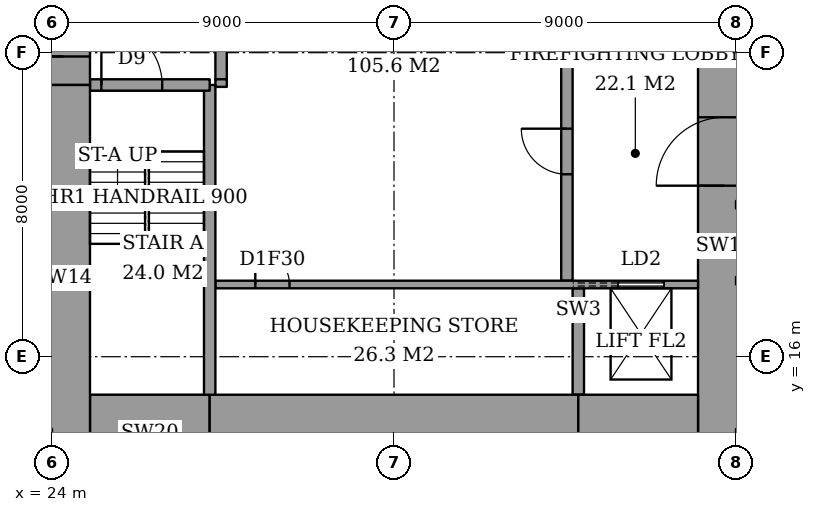
"""IFC4 building model, lengths in metres.
Left out: names, types, materials, properties, quantities, classifications, styles, units other than length and angle.
Written with IfcOpenShell. Run it as: python <this file> out.ifc"""

import sys

from ifc_helpers import new_model, si_unit, direction, frame, frame_2d, origin, place, context, subcontext, project, spatial, rectangle, extrude, element, fill, save


model = new_model("IFC4")
c1 = context("Model", 3, precision=1e-05, world=origin(), true_north=direction((0.0, 1.0)))
c2 = subcontext(c1, "Body", "Model", "MODEL_VIEW")
j1 = project(units=[si_unit("LENGTHUNIT", "METRE"), si_unit("PLANEANGLEUNIT", "RADIAN")], contexts=[c1])
p1 = place(None, origin())
s1 = spatial("IfcSite", under=j1, at=p1, CompositionType="ELEMENT")
p2 = place(p1, origin())
s2 = spatial("IfcBuilding", under=s1, at=p2, CompositionType="ELEMENT")
p3 = place(p2, frame((0.0, 0.0, 200.2)))
s3 = spatial("IfcBuildingStorey", under=s2, at=p3, CompositionType="ELEMENT", Elevation=200.2)
p4 = place(p3, frame((25.0, 14.0, 0.0), z_axis=(0.0, 0.0, 1.0), x_axis=(1.0, 0.0, 0.0)))
e1 = element("IfcWall", 1, at=p4, inside=s3, PredefinedType="SHEAR", context=c2, shape_type="SweptSolid", body=[
    extrude(rectangle(XDim=3.15, YDim=2.0, at=frame_2d((1.575, 0.0))), origin(), (0.0, 0.0, 1.0), 3.6),
])
p5 = place(p3, frame((28.15, 14.0, 0.0), z_axis=(0.0, 0.0, 1.0), x_axis=(1.0, 0.0, 0.0)))
e2 = element("IfcWall", 2, at=p5, inside=s3, PredefinedType="SHEAR", context=c2, shape_type="SweptSolid", body=[
    extrude(rectangle(XDim=9.7, YDim=2.0, at=frame_2d((4.85, 0.0))), origin(), (0.0, 0.0, 1.0), 3.6),
])
p6 = place(p3, frame((37.85, 14.0, 0.0), z_axis=(0.0, 0.0, 1.0), x_axis=(1.0, 0.0, 0.0)))
e3 = element("IfcWall", 3, at=p6, inside=s3, PredefinedType="SHEAR", context=c2, shape_type="SweptSolid", body=[
    extrude(rectangle(XDim=3.15, YDim=2.0, at=frame_2d((1.575, 0.0))), origin(), (0.0, 0.0, 1.0), 3.6),
])
p7 = place(p3, frame((24.3, 13.0, 0.0), z_axis=(0.0, 0.0, 1.0), x_axis=(0.0, 1.0, 0.0)))
e4 = element("IfcWall", 4, at=p7, inside=s3, PredefinedType="SHEAR", context=c2, shape_type="SweptSolid", body=[
    extrude(rectangle(XDim=10.15, YDim=1.4, at=frame_2d((5.075, 0.0))), origin(), (0.0, 0.0, 1.0), 3.6),
])
p8 = place(p3, frame((24.3, 23.15, 0.0), z_axis=(0.0, 0.0, 1.0), x_axis=(0.0, 1.0, 0.0)))
e5 = element("IfcWall", 5, at=p8, inside=s3, PredefinedType="SHEAR", context=c2, shape_type="SweptSolid", body=[
    extrude(rectangle(XDim=11.85, YDim=1.4, at=frame_2d((5.925, 0.0))), origin(), (0.0, 0.0, 1.0), 3.6),
])
p9 = place(p8, frame((0.75, 0.0, 0.0)))
e6 = element("IfcOpeningElement", 6, at=p9, cuts=e5, PredefinedType="OPENING", context=c2, shape_type="SweptSolid", body=[
    extrude(rectangle(XDim=1.8, YDim=2.4, at=frame_2d((0.9, 1.2))), frame((0.0, 0.71, 0.0), z_axis=(0.0, -1.0, 0.0), x_axis=(1.0, 0.0, 0.0)), (0.0, 0.0, 1.0), 1.42),
])
p10 = place(p3, frame((41.7, 13.0, 0.0), z_axis=(0.0, 0.0, 1.0), x_axis=(0.0, 1.0, 0.0)))
e7 = element("IfcWall", 7, at=p10, inside=s3, PredefinedType="SHEAR", context=c2, shape_type="SweptSolid", body=[
    extrude(rectangle(XDim=11.85, YDim=1.4, at=frame_2d((5.925, 0.0))), origin(), (0.0, 0.0, 1.0), 3.6),
])
p11 = place(p10, frame((7.5, 0.0, 0.0)))
e8 = element("IfcOpeningElement", 8, at=p11, cuts=e7, PredefinedType="OPENING", context=c2, shape_type="SweptSolid", body=[
    extrude(rectangle(XDim=1.8, YDim=2.4, at=frame_2d((0.9, 1.2))), frame((0.0, 0.71, 0.0), z_axis=(0.0, -1.0, 0.0), x_axis=(1.0, 0.0, 0.0)), (0.0, 0.0, 1.0), 1.42),
])
p12 = place(p3, frame((28.15, 15.0, 0.0), z_axis=(0.0, 0.0, 1.0), x_axis=(0.0, 1.0, 0.0)))
e9 = element("IfcWall", 9, at=p12, inside=s3, PredefinedType="SHEAR", context=c2, shape_type="SweptSolid", body=[
    extrude(rectangle(XDim=8.15, YDim=0.3, at=frame_2d((4.075, 0.0))), origin(), (0.0, 0.0, 1.0), 3.6),
])
p13 = place(p3, frame((25.0, 23.15, 0.0), z_axis=(0.0, 0.0, 1.0), x_axis=(1.0, 0.0, 0.0)))
e10 = element("IfcWall", 10, at=p13, inside=s3, PredefinedType="SHEAR", context=c2, shape_type="SweptSolid", body=[
    extrude(rectangle(XDim=3.15, YDim=0.3, at=frame_2d((1.575, 0.0))), origin(), (0.0, 0.0, 1.0), 3.6),
])
p14 = place(p13, frame((0.3, 0.0, 0.0)))
e11 = element("IfcOpeningElement", 11, at=p14, cuts=e10, PredefinedType="OPENING", context=c2, shape_type="SweptSolid", body=[
    extrude(rectangle(XDim=1.6, YDim=2.1, at=frame_2d((0.8, 1.05))), frame((0.0, 0.16, 0.0), z_axis=(0.0, -1.0, 0.0), x_axis=(1.0, 0.0, 0.0)), (0.0, 0.0, 1.0), 0.32),
])
p15 = place(p3, frame((28.45, 23.3, 0.0), z_axis=(0.0, 0.0, 1.0), x_axis=(0.0, 1.0, 0.0)))
e12 = element("IfcWall", 12, at=p15, inside=s3, PredefinedType="PARTITIONING", context=c2, shape_type="SweptSolid", body=[
    extrude(rectangle(XDim=6.7, YDim=0.3, at=frame_2d((3.35, 0.0))), origin(), (0.0, 0.0, 1.0), 3.6),
])
p16 = place(p15, frame((2.7, 0.0, 0.0)))
e13 = element("IfcOpeningElement", 13, at=p16, cuts=e12, PredefinedType="OPENING", context=c2, shape_type="SweptSolid", body=[
    extrude(rectangle(XDim=1.2, YDim=2.1, at=frame_2d((0.6, 1.05))), frame((0.0, 0.16, 0.0), z_axis=(0.0, -1.0, 0.0), x_axis=(1.0, 0.0, 0.0)), (0.0, 0.0, 1.0), 0.32),
])
p17 = place(p3, frame((37.55, 18.0, 0.0), z_axis=(0.0, 0.0, 1.0), x_axis=(0.0, 1.0, 0.0)))
e14 = element("IfcWall", 14, at=p17, inside=s3, PredefinedType="PARTITIONING", context=c2, shape_type="SweptSolid", body=[
    extrude(rectangle(XDim=6.7, YDim=0.3, at=frame_2d((3.35, 0.0))), origin(), (0.0, 0.0, 1.0), 3.6),
])
p18 = place(p17, frame((2.8, 0.0, 0.0)))
e15 = element("IfcOpeningElement", 15, at=p18, cuts=e14, PredefinedType="OPENING", context=c2, shape_type="SweptSolid", body=[
    extrude(rectangle(XDim=1.2, YDim=2.1, at=frame_2d((0.6, 1.05))), frame((0.0, 0.16, 0.0), z_axis=(0.0, -1.0, 0.0), x_axis=(1.0, 0.0, 0.0)), (0.0, 0.0, 1.0), 0.32),
])
p19 = place(p3, frame((28.3, 17.9, 0.0), z_axis=(0.0, 0.0, 1.0), x_axis=(1.0, 0.0, 0.0)))
e16 = element("IfcWall", 16, at=p19, inside=s3, PredefinedType="PARTITIONING", context=c2, shape_type="SweptSolid", body=[
    extrude(rectangle(XDim=12.7, YDim=0.2, at=frame_2d((6.35, 0.0))), origin(), (0.0, 0.0, 1.0), 3.6),
])
p20 = place(p19, frame((1.05, 0.0, 0.0)))
e17 = element("IfcOpeningElement", 17, at=p20, cuts=e16, PredefinedType="OPENING", context=c2, shape_type="SweptSolid", body=[
    extrude(rectangle(XDim=0.9, YDim=2.1, at=frame_2d((0.45, 1.05))), frame((0.0, 0.11, 0.0), z_axis=(0.0, -1.0, 0.0), x_axis=(1.0, 0.0, 0.0)), (0.0, 0.0, 1.0), 0.22),
])
p21 = place(p19, frame((10.6, 0.0, 0.0)))
e18 = element("IfcOpeningElement", 18, at=p21, cuts=e16, PredefinedType="OPENING", context=c2, shape_type="SweptSolid", body=[
    extrude(rectangle(XDim=1.2, YDim=2.1, at=frame_2d((0.6, 1.05))), frame((0.0, 0.11, 0.0), z_axis=(0.0, -1.0, 0.0), x_axis=(1.0, 0.0, 0.0)), (0.0, 0.0, 1.0), 0.22),
])
p22 = place(p3, frame((37.85, 15.0, 0.0), z_axis=(0.0, 0.0, 1.0), x_axis=(0.0, 1.0, 0.0)))
e19 = element("IfcWall", 19, at=p22, inside=s3, PredefinedType="SHEAR", context=c2, shape_type="SweptSolid", body=[
    extrude(rectangle(XDim=2.8, YDim=0.3, at=frame_2d((1.4, 0.0))), origin(), (0.0, 0.0, 1.0), 3.6),
])
p23 = place(p3, frame((28.3, 23.2, 0.0), z_axis=(0.0, 0.0, 1.0), x_axis=(1.0, 0.0, 0.0)))
e20 = element("IfcWall", 20, at=p23, inside=s3, PredefinedType="PARTITIONING", context=c2, shape_type="SweptSolid", body=[
    extrude(rectangle(XDim=0.3, YDim=0.2, at=frame_2d((0.15, 0.0))), origin(), (0.0, 0.0, 1.0), 3.6),
])
p24 = place(p14, origin())
e21 = element("IfcDoor", 21, at=p24, inside=s3, OperationType="DOUBLE_DOOR_SINGLE_SWING", PredefinedType="DOOR", context=c2, shape_type="SweptSolid", body=[
    extrude(rectangle(XDim=1.6, YDim=2.1, at=frame_2d((0.8, 1.05))), frame((0.0, 0.025, 0.0), z_axis=(0.0, -1.0, 0.0), x_axis=(1.0, 0.0, 0.0)), (0.0, 0.0, 1.0), 0.05),
])
fill(e11, e21)
p25 = place(p18, origin())
e22 = element("IfcDoor", 22, at=p25, inside=s3, OperationType="SINGLE_SWING_LEFT", PredefinedType="DOOR", context=c2, shape_type="SweptSolid", body=[
    extrude(rectangle(XDim=1.2, YDim=2.1, at=frame_2d((0.6, 1.05))), frame((0.0, 0.025, 0.0), z_axis=(0.0, -1.0, 0.0), x_axis=(1.0, 0.0, 0.0)), (0.0, 0.0, 1.0), 0.05),
])
fill(e15, e22)
p26 = place(p9, origin())
e23 = element("IfcDoor", 23, at=p26, inside=s3, OperationType="DOUBLE_DOOR_DOUBLE_SWING", PredefinedType="DOOR", context=c2, shape_type="SweptSolid", body=[
    extrude(rectangle(XDim=1.8, YDim=2.4, at=frame_2d((0.9, 1.2))), frame((0.0, 0.025, 0.0), z_axis=(0.0, -1.0, 0.0), x_axis=(1.0, 0.0, 0.0)), (0.0, 0.0, 1.0), 0.05),
])
fill(e6, e23)
p27 = place(p11, origin())
e24 = element("IfcDoor", 24, at=p27, inside=s3, OperationType="DOUBLE_DOOR_DOUBLE_SWING", PredefinedType="DOOR", context=c2, shape_type="SweptSolid", body=[
    extrude(rectangle(XDim=1.8, YDim=2.4, at=frame_2d((0.9, 1.2))), frame((0.0, 0.025, 0.0), z_axis=(0.0, -1.0, 0.0), x_axis=(1.0, 0.0, 0.0)), (0.0, 0.0, 1.0), 0.05),
])
fill(e8, e24)
p28 = place(p20, origin())
e25 = element("IfcDoor", 25, at=p28, inside=s3, OperationType="SINGLE_SWING_RIGHT", PredefinedType="DOOR", context=c2, shape_type="SweptSolid", body=[
    extrude(rectangle(XDim=0.9, YDim=2.1, at=frame_2d((0.45, 1.05))), frame((0.0, 0.025, 0.0), z_axis=(0.0, -1.0, 0.0), x_axis=(1.0, 0.0, 0.0)), (0.0, 0.0, 1.0), 0.05),
])
fill(e17, e25)
p29 = place(p21, origin())
e26 = element("IfcDoor", 26, at=p29, inside=s3, OperationType="SLIDING_TO_LEFT", PredefinedType="DOOR", context=c2, shape_type="SweptSolid", body=[
    extrude(rectangle(XDim=1.2, YDim=2.1, at=frame_2d((0.6, 1.05))), frame((0.0, 0.025, 0.0), z_axis=(0.0, -1.0, 0.0), x_axis=(1.0, 0.0, 0.0)), (0.0, 0.0, 1.0), 0.05),
])
fill(e18, e26)
save(model, sys.argv[1])
